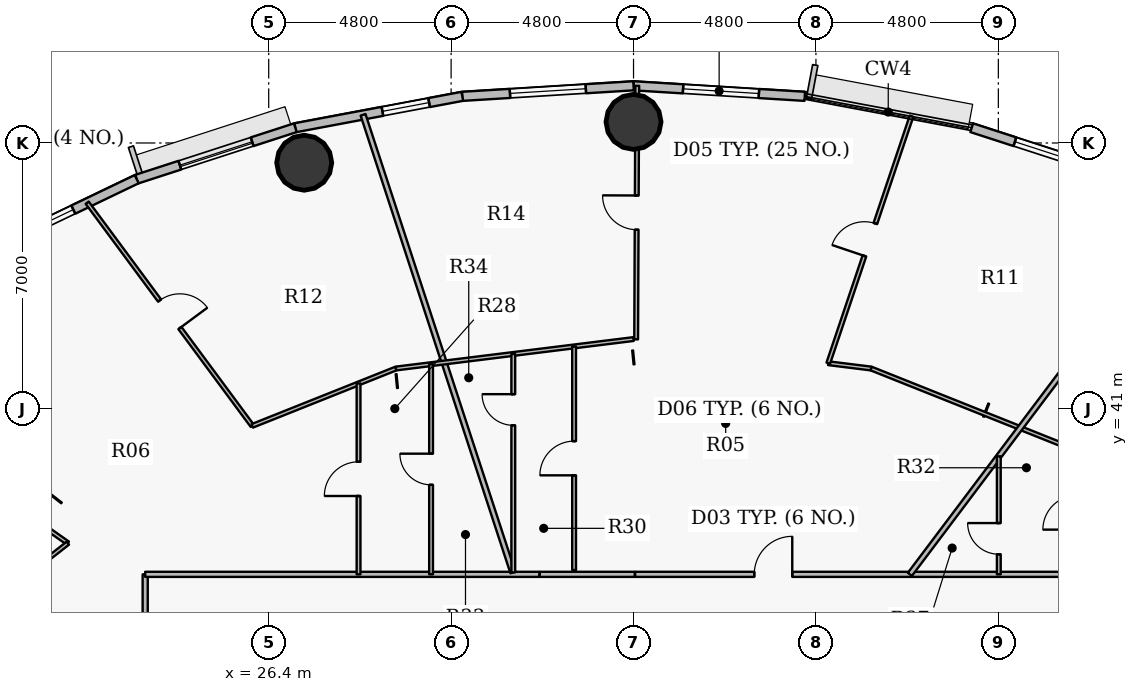
"""IFC4 building model, lengths in metres.
Left out: names, types, materials, properties, quantities, classifications, styles, units other than length and angle.
Written with IfcOpenShell. Run it as: python <this file> out.ifc"""

import sys

from ifc_helpers import new_model, si_unit, direction, frame, frame_2d, origin, origin_2d, place, context, subcontext, project, spatial, rectangle, hollow_circle, extrude, source, transform, mapped, element, fill, save


model = new_model("IFC4")
c1 = context("Model", 3, precision=1e-05, world=origin(), true_north=direction((0.0, 1.0)))
c2 = subcontext(c1, "Body", "Model", "MODEL_VIEW")
j1 = project(units=[si_unit("LENGTHUNIT", "METRE"), si_unit("PLANEANGLEUNIT", "RADIAN")], contexts=[c1])
p1 = place(None, origin())
s1 = spatial("IfcSite", under=j1, at=p1, CompositionType="ELEMENT")
p2 = place(p1, origin())
s2 = spatial("IfcBuilding", under=s1, at=p2, CompositionType="ELEMENT")
p3 = place(p2, frame((0.0, 0.0, 112.2)))
s3 = spatial("IfcBuildingStorey", under=s2, at=p3, CompositionType="ELEMENT", Elevation=112.2)
for number, where, z_axis, x_axis in (
    (1, (36.0, 48.555, 0.0), (0.0, 0.0, 1.0), (1.0, 0.0, 0.0)),
    (2, (27.334, 47.481, 0.0), (0.0, 0.0, 1.0), (1.0, 0.0, 0.0)),
):
    element("IfcColumn", number, at=place(p3, frame(where, z_axis=z_axis, x_axis=x_axis)), inside=s3, PredefinedType="COLUMN", context=c2, shape_type="SweptSolid", body=[
        extrude(hollow_circle(Radius=0.725, WallThickness=0.042, at=origin_2d()), origin(), (0.0, 0.0, 1.0), 3.75),
    ])
p4 = place(p3, frame((44.9, 48.401, 0.0), z_axis=(0.0, 0.0, 1.0), x_axis=(0.951211346073, -0.308540070495, 0.0)))
e3 = element("IfcWall", 3, at=p4, inside=s3, PredefinedType="SOLIDWALL", context=c2, shape_type="SweptSolid", body=[
    extrude(rectangle(XDim=4.388, YDim=0.24, at=frame_2d((2.194, 0.0))), origin(), (0.0, 0.0, 1.0), 3.5),
])
p5 = place(p4, frame((1.194, 0.0, 0.9)))
e4 = element("IfcOpeningElement", 4, at=p5, cuts=e3, PredefinedType="OPENING", context=c2, shape_type="SweptSolid", body=[
    extrude(rectangle(XDim=2.0, YDim=1.75, at=origin_2d()), frame((1.0, 0.13, 0.875), z_axis=(0.0, -1.0, 0.0), x_axis=(1.0, 0.0, 0.0)), (0.0, 0.0, 1.0), 0.26),
])
p6 = place(p3, frame((36.0, 49.505, 0.0), z_axis=(0.0, 0.0, 1.0), x_axis=(0.998107531589, -0.061492726276, 0.0)))
e5 = element("IfcWall", 5, at=p6, inside=s3, PredefinedType="SOLIDWALL", context=c2, shape_type="SweptSolid", body=[
    extrude(rectangle(XDim=4.514, YDim=0.24, at=frame_2d((2.257, 0.0))), origin(), (0.0, 0.0, 1.0), 3.5),
])
p7 = place(p6, frame((1.306, 0.0, 0.9)))
e6 = element("IfcOpeningElement", 6, at=p7, cuts=e5, PredefinedType="OPENING", context=c2, shape_type="SweptSolid", body=[
    extrude(rectangle(XDim=2.0, YDim=1.75, at=origin_2d()), frame((1.0, 0.13, 0.875), z_axis=(0.0, -1.0, 0.0), x_axis=(1.0, 0.0, 0.0)), (0.0, 0.0, 1.0), 0.26),
])
p8 = place(p3, frame((31.494, 49.227, 0.0), z_axis=(0.0, 0.0, 1.0), x_axis=(0.998107531589, 0.061492726276, 0.0)))
e7 = element("IfcWall", 7, at=p8, inside=s3, PredefinedType="SOLIDWALL", context=c2, shape_type="SweptSolid", body=[
    extrude(rectangle(XDim=4.514, YDim=0.24, at=frame_2d((2.257, 0.0))), origin(), (0.0, 0.0, 1.0), 3.5),
])
p9 = place(p8, frame((1.257, 0.0, 0.9)))
e8 = element("IfcOpeningElement", 8, at=p9, cuts=e7, PredefinedType="OPENING", context=c2, shape_type="SweptSolid", body=[
    extrude(rectangle(XDim=2.0, YDim=1.75, at=origin_2d()), frame((1.0, 0.13, 0.875), z_axis=(0.0, -1.0, 0.0), x_axis=(1.0, 0.0, 0.0)), (0.0, 0.0, 1.0), 0.26),
])
p10 = place(p3, frame((27.1, 48.401, 0.0), z_axis=(0.0, 0.0, 1.0), x_axis=(0.982789252177, 0.184730305596, 0.0)))
e9 = element("IfcWall", 9, at=p10, inside=s3, PredefinedType="SOLIDWALL", context=c2, shape_type="SweptSolid", body=[
    extrude(rectangle(XDim=4.471, YDim=0.24, at=frame_2d((2.235, 0.0))), origin(), (0.0, 0.0, 1.0), 3.5),
])
p11 = place(p10, frame((2.333, 0.0, 0.9)))
e10 = element("IfcOpeningElement", 10, at=p11, cuts=e9, PredefinedType="OPENING", context=c2, shape_type="SweptSolid", body=[
    extrude(rectangle(XDim=1.25, YDim=1.65, at=origin_2d()), frame((0.625, 0.13, 0.825), z_axis=(0.0, -1.0, 0.0), x_axis=(1.0, 0.0, 0.0)), (0.0, 0.0, 1.0), 0.26),
])
p12 = place(p3, frame((22.926, 47.047, 0.0), z_axis=(0.0, 0.0, 1.0), x_axis=(0.951211346073, 0.308540070495, 0.0)))
e11 = element("IfcWall", 11, at=p12, inside=s3, PredefinedType="SOLIDWALL", context=c2, shape_type="SweptSolid", body=[
    extrude(rectangle(XDim=4.388, YDim=0.24, at=frame_2d((2.194, 0.0))), origin(), (0.0, 0.0, 1.0), 3.5),
])
p13 = place(p12, frame((1.194, 0.0, 0.9)))
e12 = element("IfcOpeningElement", 12, at=p13, cuts=e11, PredefinedType="OPENING", context=c2, shape_type="SweptSolid", body=[
    extrude(rectangle(XDim=2.0, YDim=1.75, at=origin_2d()), frame((1.0, 0.13, 0.875), z_axis=(0.0, -1.0, 0.0), x_axis=(1.0, 0.0, 0.0)), (0.0, 0.0, 1.0), 0.26),
])
p14 = place(p3, frame((19.075, 45.199, 0.0), z_axis=(0.0, 0.0, 1.0), x_axis=(0.901589935876, 0.432591709962, 0.0)))
e13 = element("IfcWall", 13, at=p14, inside=s3, PredefinedType="SOLIDWALL", context=c2, shape_type="SweptSolid", body=[
    extrude(rectangle(XDim=4.272, YDim=0.24, at=frame_2d((2.136, 0.0))), origin(), (0.0, 0.0, 1.0), 3.5),
])
p15 = place(p14, frame((0.822, 0.0, 0.9)))
e14 = element("IfcOpeningElement", 14, at=p15, cuts=e13, PredefinedType="OPENING", context=c2, shape_type="SweptSolid", body=[
    extrude(rectangle(XDim=1.6, YDim=1.75, at=origin_2d()), frame((0.8, 0.13, 0.875), z_axis=(0.0, -1.0, 0.0), x_axis=(1.0, 0.0, 0.0)), (0.0, 0.0, 1.0), 0.26),
])
p16 = place(p3, frame((14.661, 42.011, 0.0), z_axis=(0.0, 0.0, 1.0), x_axis=(0.817899711196, -0.575360810645, 0.0)))
e15 = element("IfcWall", 15, at=p16, inside=s3, PredefinedType="PARTITIONING", context=c2, shape_type="SweptSolid", body=[
    extrude(rectangle(XDim=7.891, YDim=0.1, at=frame_2d((3.945, 0.0))), origin(), (0.0, 0.0, 1.0), 2.935),
])
p17 = place(p16, frame((3.495, 0.0, 0.0)))
e16 = element("IfcOpeningElement", 16, at=p17, cuts=e15, PredefinedType="OPENING", context=c2, shape_type="SweptSolid", body=[
    extrude(rectangle(XDim=0.9, YDim=2.1, at=origin_2d()), frame((0.45, 0.06, 1.05), z_axis=(0.0, -1.0, 0.0), x_axis=(1.0, 0.0, 0.0)), (0.0, 0.0, 1.0), 0.12),
])
p18 = place(p3, frame((19.634, 36.311, 0.0), z_axis=(0.0, 0.0, 1.0), x_axis=(0.787307829703, 0.616560119768, 0.0)))
e17 = element("IfcWall", 17, at=p18, inside=s3, PredefinedType="PARTITIONING", context=c2, shape_type="SweptSolid", body=[
    extrude(rectangle(XDim=1.882, YDim=0.1, at=frame_2d((0.941, 0.0))), origin(), (0.0, 0.0, 1.0), 3.5),
])
p19 = place(p3, frame((21.624, 46.428, 0.0), z_axis=(0.0, 0.0, 1.0), x_axis=(0.594804555611, -0.803870350631, 0.0)))
e18 = element("IfcWall", 18, at=p19, inside=s3, PredefinedType="PARTITIONING", context=c2, shape_type="SweptSolid", body=[
    extrude(rectangle(XDim=7.303, YDim=0.1, at=frame_2d((3.652, 0.0))), origin(), (0.0, 0.0, 1.0), 2.935),
])
p20 = place(p19, frame((3.202, 0.0, 0.0)))
e19 = element("IfcOpeningElement", 19, at=p20, cuts=e18, PredefinedType="OPENING", context=c2, shape_type="SweptSolid", body=[
    extrude(rectangle(XDim=0.9, YDim=2.1, at=origin_2d()), frame((0.45, 0.06, 1.05), z_axis=(0.0, -1.0, 0.0), x_axis=(1.0, 0.0, 0.0)), (0.0, 0.0, 1.0), 0.12),
])
p21 = place(p3, frame((23.15, 17.35, 0.0), z_axis=(0.0, 0.0, 1.0), x_axis=(0.0, 1.0, 0.0)))
e20 = element("IfcWall", 20, at=p21, inside=s3, PredefinedType="PARTITIONING", context=c2, shape_type="SweptSolid", body=[
    extrude(rectangle(XDim=19.3, YDim=0.135, at=frame_2d((9.65, 0.0))), origin(), (0.0, 0.0, 1.0), 2.935),
])
p22 = place(p21, frame((15.889, 0.0, 0.0)))
e21 = element("IfcOpeningElement", 21, at=p22, cuts=e20, PredefinedType="OPENING", context=c2, shape_type="SweptSolid", body=[
    extrude(rectangle(XDim=1.0, YDim=2.15, at=origin_2d()), frame((0.5, 0.078, 1.075), z_axis=(0.0, -1.0, 0.0), x_axis=(1.0, 0.0, 0.0)), (0.0, 0.0, 1.0), 0.155),
])
p23 = place(p21, frame((6.279, 0.0, 0.0)))
e22 = element("IfcOpeningElement", 22, at=p23, cuts=e20, PredefinedType="OPENING", context=c2, shape_type="SweptSolid", body=[
    extrude(rectangle(XDim=1.0, YDim=2.15, at=origin_2d()), frame((0.5, 0.078, 1.075), z_axis=(0.0, -1.0, 0.0), x_axis=(1.0, 0.0, 0.0)), (0.0, 0.0, 1.0), 0.155),
])
p24 = place(p3, frame((23.15, 36.65, 0.0), z_axis=(0.0, 0.0, 1.0), x_axis=(1.0, 0.0, 0.0)))
e23 = element("IfcWall", 23, at=p24, inside=s3, PredefinedType="PARTITIONING", context=c2, shape_type="SweptSolid", body=[
    extrude(rectangle(XDim=10.373, YDim=0.135, at=frame_2d((5.187, 0.0))), origin(), (0.0, 0.0, 1.0), 2.935),
])
p25 = place(p3, frame((25.968, 40.557, 0.0), z_axis=(0.0, 0.0, 1.0), x_axis=(0.928807252466, 0.37056320347, 0.0)))
e24 = element("IfcWall", 24, at=p25, inside=s3, PredefinedType="PARTITIONING", context=c2, shape_type="SweptSolid", body=[
    extrude(rectangle(XDim=4.07, YDim=0.1, at=frame_2d((2.035, 0.0))), origin(), (0.0, 0.0, 1.0), 2.935),
])
p26 = place(p3, frame((28.764, 36.65, 0.0), z_axis=(0.0, 0.0, 1.0), x_axis=(0.0, 1.0, 0.0)))
e25 = element("IfcWall", 25, at=p26, inside=s3, PredefinedType="PARTITIONING", context=c2, shape_type="SweptSolid", body=[
    extrude(rectangle(XDim=5.023, YDim=0.1, at=frame_2d((2.511, 0.0))), origin(), (0.0, 0.0, 1.0), 3.5),
])
p27 = place(p26, frame((2.062, 0.0, 0.0)))
e26 = element("IfcOpeningElement", 26, at=p27, cuts=e25, PredefinedType="OPENING", context=c2, shape_type="SweptSolid", body=[
    extrude(rectangle(XDim=0.9, YDim=2.1, at=origin_2d()), frame((0.45, 0.06, 1.05), z_axis=(0.0, -1.0, 0.0), x_axis=(1.0, 0.0, 0.0)), (0.0, 0.0, 1.0), 0.12),
])
p28 = place(p3, frame((28.883, 48.741, 0.0), z_axis=(0.0, 0.0, 1.0), x_axis=(0.311090320612, -0.95038035145, 0.0)))
e27 = element("IfcWall", 27, at=p28, inside=s3, PredefinedType="PARTITIONING", context=c2, shape_type="SweptSolid", body=[
    extrude(rectangle(XDim=12.671, YDim=0.135, at=frame_2d((6.335, 0.0))), origin(), (0.0, 0.0, 1.0), 2.935),
])
p29 = place(p3, frame((29.749, 42.066, 0.0), z_axis=(0.0, 0.0, 1.0), x_axis=(0.992395485088, 0.123090215599, 0.0)))
e28 = element("IfcWall", 28, at=p29, inside=s3, PredefinedType="PARTITIONING", context=c2, shape_type="SweptSolid", body=[
    extrude(rectangle(XDim=6.299, YDim=0.1, at=frame_2d((3.15, 0.0))), origin(), (0.0, 0.0, 1.0), 2.935),
])
p30 = place(p3, frame((30.673, 36.65, 0.0), z_axis=(0.0, 0.0, 1.0), x_axis=(0.0, 1.0, 0.0)))
e29 = element("IfcWall", 29, at=p30, inside=s3, PredefinedType="PARTITIONING", context=c2, shape_type="SweptSolid", body=[
    extrude(rectangle(XDim=5.53, YDim=0.1, at=frame_2d((2.765, 0.0))), origin(), (0.0, 0.0, 1.0), 2.935),
])
p31 = place(p30, frame((2.355, 0.0, 0.0)))
e30 = element("IfcOpeningElement", 30, at=p31, cuts=e29, PredefinedType="OPENING", context=c2, shape_type="SweptSolid", body=[
    extrude(rectangle(XDim=0.82, YDim=2.1, at=origin_2d()), frame((0.41, 0.06, 1.05), z_axis=(0.0, -1.0, 0.0), x_axis=(1.0, 0.0, 0.0)), (0.0, 0.0, 1.0), 0.12),
])
p32 = place(p3, frame((32.836, 36.701, 0.0), z_axis=(0.0, 0.0, 1.0), x_axis=(0.0, 1.0, 0.0)))
e31 = element("IfcWall", 31, at=p32, inside=s3, PredefinedType="PARTITIONING", context=c2, shape_type="SweptSolid", body=[
    extrude(rectangle(XDim=5.748, YDim=0.1, at=frame_2d((2.874, 0.0))), origin(), (0.0, 0.0, 1.0), 2.985),
])
p33 = place(p32, frame((3.87, 0.0, 0.0)))
e32 = element("IfcOpeningElement", 32, at=p33, cuts=e31, PredefinedType="OPENING", context=c2, shape_type="SweptSolid", body=[
    extrude(rectangle(XDim=0.82, YDim=2.1, at=origin_2d()), frame((0.41, 0.06, 1.05), z_axis=(0.0, -1.0, 0.0), x_axis=(1.0, 0.0, 0.0)), (0.0, 0.0, 1.0), 0.12),
])
p34 = place(p3, frame((34.436, 36.763, 0.0), z_axis=(0.0, 0.0, 1.0), x_axis=(0.0, 1.0, 0.0)))
e33 = element("IfcWall", 33, at=p34, inside=s3, PredefinedType="PARTITIONING", context=c2, shape_type="SweptSolid", body=[
    extrude(rectangle(XDim=5.884, YDim=0.1, at=frame_2d((2.942, 0.0))), origin(), (0.0, 0.0, 1.0), 2.985),
])
p35 = place(p34, frame((2.492, 0.0, 0.0)))
e34 = element("IfcOpeningElement", 34, at=p35, cuts=e33, PredefinedType="OPENING", context=c2, shape_type="SweptSolid", body=[
    extrude(rectangle(XDim=0.9, YDim=2.1, at=origin_2d()), frame((0.45, 0.06, 1.05), z_axis=(0.0, -1.0, 0.0), x_axis=(1.0, 0.0, 0.0)), (0.0, 0.0, 1.0), 0.12),
])
p36 = place(p3, frame((36.042, 36.65, 0.0), z_axis=(0.0, 0.0, 1.0), x_axis=(1.0, 0.0, 0.0)))
e35 = element("IfcWall", 35, at=p36, inside=s3, PredefinedType="PARTITIONING", context=c2, shape_type="SweptSolid", body=[
    extrude(rectangle(XDim=12.808, YDim=0.135, at=frame_2d((6.404, 0.0))), origin(), (0.0, 0.0, 1.0), 2.935),
])
p37 = place(p36, frame((3.135, 0.0, 0.0)))
e36 = element("IfcOpeningElement", 36, at=p37, cuts=e35, PredefinedType="OPENING", context=c2, shape_type="SweptSolid", body=[
    extrude(rectangle(XDim=1.0, YDim=2.15, at=origin_2d()), frame((0.5, 0.078, 1.075), z_axis=(0.0, -1.0, 0.0), x_axis=(1.0, 0.0, 0.0)), (0.0, 0.0, 1.0), 0.155),
])
p38 = place(p3, frame((36.069, 42.833, 0.0), z_axis=(0.0, 0.0, 1.0), x_axis=(0.004354785612, 0.999990517876, 0.0)))
e37 = element("IfcWall", 37, at=p38, inside=s3, PredefinedType="PARTITIONING", context=c2, shape_type="SweptSolid", body=[
    extrude(rectangle(XDim=6.671, YDim=0.1, at=frame_2d((3.336, 0.0))), origin(), (0.0, 0.0, 1.0), 2.935),
])
p39 = place(p38, frame((2.886, 0.0, 0.0)))
e38 = element("IfcOpeningElement", 38, at=p39, cuts=e37, PredefinedType="OPENING", context=c2, shape_type="SweptSolid", body=[
    extrude(rectangle(XDim=0.9, YDim=2.1, at=origin_2d()), frame((0.45, 0.06, 1.05), z_axis=(0.0, -1.0, 0.0), x_axis=(1.0, 0.0, 0.0)), (0.0, 0.0, 1.0), 0.12),
])
p40 = place(p3, frame((41.125, 42.205, 0.0), z_axis=(0.0, 0.0, 1.0), x_axis=(0.99240961586, -0.122976234894, 0.0)))
e39 = element("IfcWall", 39, at=p40, inside=s3, PredefinedType="PARTITIONING", context=c2, shape_type="SweptSolid", body=[
    extrude(rectangle(XDim=1.135, YDim=0.1, at=frame_2d((0.568, 0.0))), origin(), (0.0, 0.0, 1.0), 3.5),
])
p41 = place(p3, frame((41.125, 42.205, 0.0), z_axis=(0.0, 0.0, 1.0), x_axis=(0.319387131438, 0.947624324441, 0.0)))
e40 = element("IfcWall", 40, at=p41, inside=s3, PredefinedType="PARTITIONING", context=c2, shape_type="SweptSolid", body=[
    extrude(rectangle(XDim=6.858, YDim=0.1, at=frame_2d((3.429, 0.0))), origin(), (0.0, 0.0, 1.0), 2.935),
])
p42 = place(p41, frame((2.979, 0.0, 0.0)))
e41 = element("IfcOpeningElement", 41, at=p42, cuts=e40, PredefinedType="OPENING", context=c2, shape_type="SweptSolid", body=[
    extrude(rectangle(XDim=0.9, YDim=2.1, at=origin_2d()), frame((0.45, 0.06, 1.05), z_axis=(0.0, -1.0, 0.0), x_axis=(1.0, 0.0, 0.0)), (0.0, 0.0, 1.0), 0.12),
])
p43 = place(p3, frame((42.251, 42.066, 0.0), z_axis=(0.0, 0.0, 1.0), x_axis=(0.9288090756, -0.370558633798, 0.0)))
e42 = element("IfcWall", 42, at=p43, inside=s3, PredefinedType="PARTITIONING", context=c2, shape_type="SweptSolid", body=[
    extrude(rectangle(XDim=6.072, YDim=0.1, at=frame_2d((3.036, 0.0))), origin(), (0.0, 0.0, 1.0), 2.935),
])
p44 = place(p3, frame((43.272, 36.65, 0.0), z_axis=(0.0, 0.0, 1.0), x_axis=(0.601821582461, 0.798630567211, 0.0)))
e43 = element("IfcWall", 43, at=p44, inside=s3, PredefinedType="PARTITIONING", context=c2, shape_type="SweptSolid", body=[
    extrude(rectangle(XDim=12.127, YDim=0.135, at=frame_2d((6.063, 0.0))), origin(), (0.0, 0.0, 1.0), 2.935),
])
p45 = place(p3, frame((45.612, 36.65, 0.0), z_axis=(0.0, 0.0, 1.0), x_axis=(0.0, 1.0, 0.0)))
e44 = element("IfcWall", 44, at=p45, inside=s3, PredefinedType="PARTITIONING", context=c2, shape_type="SweptSolid", body=[
    extrude(rectangle(XDim=3.106, YDim=0.1, at=frame_2d((1.553, 0.0))), origin(), (0.0, 0.0, 1.0), 3.5),
])
p46 = place(p45, frame((0.529, 0.0, 0.0)))
e45 = element("IfcOpeningElement", 45, at=p46, cuts=e44, PredefinedType="OPENING", context=c2, shape_type="SweptSolid", body=[
    extrude(rectangle(XDim=0.82, YDim=2.1, at=origin_2d()), frame((0.41, 0.06, 1.05), z_axis=(0.0, -1.0, 0.0), x_axis=(1.0, 0.0, 0.0)), (0.0, 0.0, 1.0), 0.12),
])
p47 = place(p3, frame((33.533, 36.65, 0.0), z_axis=(0.0, 0.0, 1.0), x_axis=(1.0, 0.0, 0.0)))
e46 = element("IfcWall", 46, at=p47, inside=s3, PredefinedType="PARTITIONING", context=c2, shape_type="SweptSolid", body=[
    extrude(rectangle(XDim=2.499, YDim=0.135, at=frame_2d((1.25, 0.0))), origin(), (0.0, 0.0, 1.0), 2.935),
])
m1 = source(origin(), c2, "Body", "SweptSolid", [
    extrude(rectangle(XDim=2.0, YDim=1.75, at=origin_2d()), frame((1.0, 0.03, 0.875), z_axis=(0.0, -1.0, 0.0), x_axis=(1.0, 0.0, 0.0)), (0.0, 0.0, 1.0), 0.06),
])
p48 = place(p5, origin())
e47 = element("IfcWindow", 47, at=p48, inside=s3, PartitioningType="DOUBLE_PANEL_VERTICAL", PredefinedType="WINDOW", context=c2, shape_type="MappedRepresentation", body=[
    mapped(m1, transform((0.0, 0.0, 0.0), x_axis=(1.0, 0.0, 0.0), y_axis=(0.0, 1.0, 0.0), z_axis=(0.0, 0.0, 1.0), scale=1.0)),
])
fill(e4, e47)
p49 = place(p7, origin())
e48 = element("IfcWindow", 48, at=p49, inside=s3, PartitioningType="DOUBLE_PANEL_VERTICAL", PredefinedType="WINDOW", context=c2, shape_type="MappedRepresentation", body=[
    mapped(m1, transform((0.0, 0.0, 0.0), x_axis=(1.0, 0.0, 0.0), y_axis=(0.0, 1.0, 0.0), z_axis=(0.0, 0.0, 1.0), scale=1.0)),
])
fill(e6, e48)
p50 = place(p9, origin())
e49 = element("IfcWindow", 49, at=p50, inside=s3, PartitioningType="DOUBLE_PANEL_VERTICAL", PredefinedType="WINDOW", context=c2, shape_type="MappedRepresentation", body=[
    mapped(m1, transform((0.0, 0.0, 0.0), x_axis=(1.0, 0.0, 0.0), y_axis=(0.0, 1.0, 0.0), z_axis=(0.0, 0.0, 1.0), scale=1.0)),
])
fill(e8, e49)
m2 = source(origin(), c2, "Body", "SweptSolid", [
    extrude(rectangle(XDim=1.25, YDim=1.65, at=origin_2d()), frame((0.625, 0.03, 0.825), z_axis=(0.0, -1.0, 0.0), x_axis=(1.0, 0.0, 0.0)), (0.0, 0.0, 1.0), 0.06),
])
p51 = place(p11, origin())
e50 = element("IfcWindow", 50, at=p51, inside=s3, PartitioningType="SINGLE_PANEL", PredefinedType="WINDOW", context=c2, shape_type="MappedRepresentation", body=[
    mapped(m2, transform((0.0, 0.0, 0.0), x_axis=(1.0, 0.0, 0.0), y_axis=(0.0, 1.0, 0.0), z_axis=(0.0, 0.0, 1.0), scale=1.0)),
])
fill(e10, e50)
p52 = place(p13, origin())
e51 = element("IfcWindow", 51, at=p52, inside=s3, PartitioningType="DOUBLE_PANEL_VERTICAL", PredefinedType="WINDOW", context=c2, shape_type="MappedRepresentation", body=[
    mapped(m1, transform((0.0, 0.0, 0.0), x_axis=(1.0, 0.0, 0.0), y_axis=(0.0, 1.0, 0.0), z_axis=(0.0, 0.0, 1.0), scale=1.0)),
])
fill(e12, e51)
m3 = source(origin(), c2, "Body", "SweptSolid", [
    extrude(rectangle(XDim=1.6, YDim=1.75, at=origin_2d()), frame((0.8, 0.03, 0.875), z_axis=(0.0, -1.0, 0.0), x_axis=(1.0, 0.0, 0.0)), (0.0, 0.0, 1.0), 0.06),
])
p53 = place(p15, origin())
e52 = element("IfcWindow", 52, at=p53, inside=s3, PartitioningType="DOUBLE_PANEL_VERTICAL", PredefinedType="WINDOW", context=c2, shape_type="MappedRepresentation", body=[
    mapped(m3, transform((0.0, 0.0, 0.0), x_axis=(1.0, 0.0, 0.0), y_axis=(0.0, 1.0, 0.0), z_axis=(0.0, 0.0, 1.0), scale=1.0)),
])
fill(e14, e52)
m4 = source(origin(), c2, "Body", "SweptSolid", [
    extrude(rectangle(XDim=1.0, YDim=2.15, at=origin_2d()), frame((0.5, 0.025, 1.075), z_axis=(0.0, -1.0, 0.0), x_axis=(1.0, 0.0, 0.0)), (0.0, 0.0, 1.0), 0.05),
])
p54 = place(p37, origin())
e53 = element("IfcDoor", 53, at=p54, inside=s3, OperationType="SINGLE_SWING_RIGHT", PredefinedType="DOOR", context=c2, shape_type="MappedRepresentation", body=[
    mapped(m4, transform((0.0, 0.0, 0.0), x_axis=(1.0, 0.0, 0.0), y_axis=(0.0, 1.0, 0.0), z_axis=(0.0, 0.0, 1.0), scale=1.0)),
])
fill(e36, e53)
m5 = source(origin(), c2, "Body", "SweptSolid", [
    extrude(rectangle(XDim=0.9, YDim=2.1, at=origin_2d()), frame((0.45, 0.025, 1.05), z_axis=(0.0, -1.0, 0.0), x_axis=(1.0, 0.0, 0.0)), (0.0, 0.0, 1.0), 0.05),
])
p55 = place(p42, origin())
e54 = element("IfcDoor", 54, at=p55, inside=s3, OperationType="SINGLE_SWING_LEFT", PredefinedType="DOOR", context=c2, shape_type="MappedRepresentation", body=[
    mapped(m5, transform((0.0, 0.0, 0.0), x_axis=(1.0, 0.0, 0.0), y_axis=(0.0, 1.0, 0.0), z_axis=(0.0, 0.0, 1.0), scale=1.0)),
])
fill(e41, e54)
p56 = place(p39, origin())
e55 = element("IfcDoor", 55, at=p56, inside=s3, OperationType="SINGLE_SWING_RIGHT", PredefinedType="DOOR", context=c2, shape_type="MappedRepresentation", body=[
    mapped(m5, transform((0.0, 0.0, 0.0), x_axis=(1.0, 0.0, 0.0), y_axis=(0.0, 1.0, 0.0), z_axis=(0.0, 0.0, 1.0), scale=1.0)),
])
fill(e38, e55)
p57 = place(p35, origin())
e56 = element("IfcDoor", 56, at=p57, inside=s3, OperationType="SINGLE_SWING_LEFT", PredefinedType="DOOR", context=c2, shape_type="MappedRepresentation", body=[
    mapped(m5, transform((0.0, 0.0, 0.0), x_axis=(1.0, 0.0, 0.0), y_axis=(0.0, 1.0, 0.0), z_axis=(0.0, 0.0, 1.0), scale=1.0)),
])
fill(e34, e56)
m6 = source(origin(), c2, "Body", "SweptSolid", [
    extrude(rectangle(XDim=0.82, YDim=2.1, at=origin_2d()), frame((0.41, 0.025, 1.05), z_axis=(0.0, -1.0, 0.0), x_axis=(1.0, 0.0, 0.0)), (0.0, 0.0, 1.0), 0.05),
])
p58 = place(p33, origin())
e57 = element("IfcDoor", 57, at=p58, inside=s3, OperationType="SINGLE_SWING_RIGHT", PredefinedType="DOOR", context=c2, shape_type="MappedRepresentation", body=[
    mapped(m6, transform((0.0, 0.0, 0.0), x_axis=(1.0, 0.0, 0.0), y_axis=(0.0, 1.0, 0.0), z_axis=(0.0, 0.0, 1.0), scale=1.0)),
])
fill(e32, e57)
p59 = place(p20, origin())
e58 = element("IfcDoor", 58, at=p59, inside=s3, OperationType="SINGLE_SWING_RIGHT", PredefinedType="DOOR", context=c2, shape_type="MappedRepresentation", body=[
    mapped(m5, transform((0.0, 0.0, 0.0), x_axis=(1.0, 0.0, 0.0), y_axis=(0.0, 1.0, 0.0), z_axis=(0.0, 0.0, 1.0), scale=1.0)),
])
fill(e19, e58)
p60 = place(p27, origin())
e59 = element("IfcDoor", 59, at=p60, inside=s3, OperationType="SINGLE_SWING_LEFT", PredefinedType="DOOR", context=c2, shape_type="MappedRepresentation", body=[
    mapped(m5, transform((0.0, 0.0, 0.0), x_axis=(1.0, 0.0, 0.0), y_axis=(0.0, 1.0, 0.0), z_axis=(0.0, 0.0, 1.0), scale=1.0)),
])
fill(e26, e59)
p61 = place(p31, origin())
e60 = element("IfcDoor", 60, at=p61, inside=s3, OperationType="SINGLE_SWING_RIGHT", PredefinedType="DOOR", context=c2, shape_type="MappedRepresentation", body=[
    mapped(m6, transform((0.0, 0.0, 0.0), x_axis=(1.0, 0.0, 0.0), y_axis=(0.0, 1.0, 0.0), z_axis=(0.0, 0.0, 1.0), scale=1.0)),
])
fill(e30, e60)
p62 = place(p46, origin())
e61 = element("IfcDoor", 61, at=p62, inside=s3, OperationType="SINGLE_SWING_RIGHT", PredefinedType="DOOR", context=c2, shape_type="MappedRepresentation", body=[
    mapped(m6, transform((0.0, 0.0, 0.0), x_axis=(1.0, 0.0, 0.0), y_axis=(0.0, 1.0, 0.0), z_axis=(0.0, 0.0, 1.0), scale=1.0)),
])
fill(e45, e61)
save(model, sys.argv[1])
